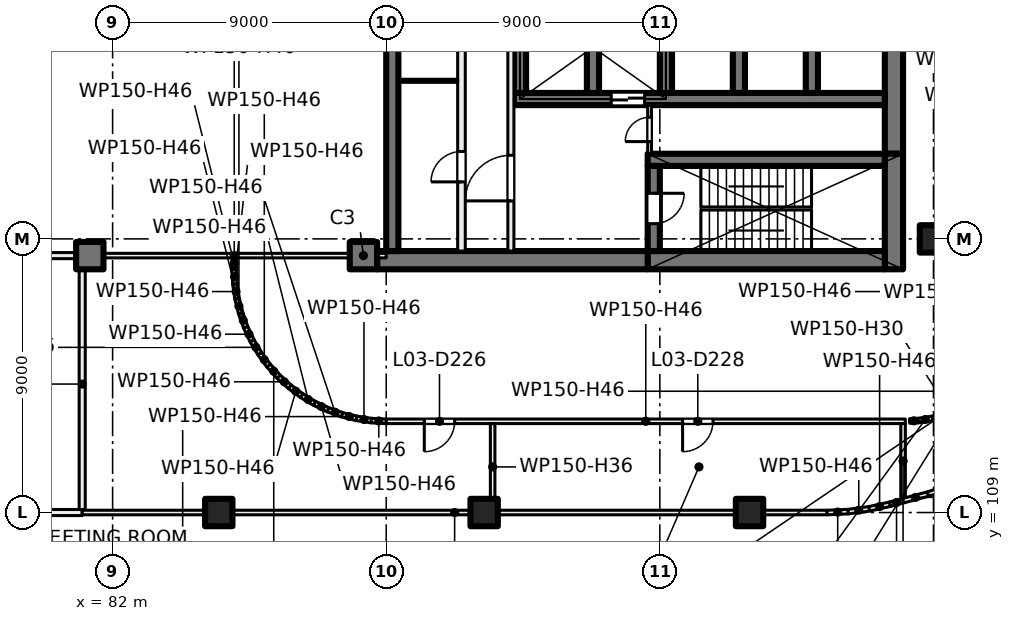
"""IFC4 building model, lengths in metres.
Left out: names, types, materials, properties, quantities, classifications, styles, units other than length and angle.
Written with IfcOpenShell. Run it as: python <this file> out.ifc"""

import sys

from ifc_helpers import new_model, si_unit, direction, frame, frame_2d, origin, origin_2d, place, context, subcontext, project, spatial, rectangle, extrude, element, fill, save


model = new_model("IFC4")
c1 = context("Model", 3, precision=1e-05, world=origin(), true_north=direction((0.0, 1.0)))
c2 = subcontext(c1, "Body", "Model", "MODEL_VIEW")
j1 = project(units=[si_unit("LENGTHUNIT", "METRE"), si_unit("PLANEANGLEUNIT", "RADIAN")], contexts=[c1])
p1 = place(None, origin())
s1 = spatial("IfcSite", under=j1, at=p1, CompositionType="ELEMENT")
p2 = place(p1, origin())
s2 = spatial("IfcBuilding", under=s1, at=p2, CompositionType="ELEMENT")
p3 = place(p2, frame((0.0, 0.0, 17.5)))
s3 = spatial("IfcBuildingStorey", under=s2, at=p3, CompositionType="ELEMENT", Elevation=17.5)
for number, where, z_axis, x_axis in (
    (1, (109.0, 118.0, 0.0), (0.0, 0.0, 1.0), (1.0, 0.0, 0.0)),
    (2, (85.491, 109.0, 0.0), (0.0, 0.0, 1.0), (1.0, 0.0, 0.0)),
    (3, (94.221, 109.0, 0.0), (0.0, 0.0, 1.0), (1.0, 0.0, 0.0)),
    (4, (102.95, 109.0, 0.0), (0.0, 0.0, 1.0), (1.0, 0.0, 0.0)),
    (5, (81.25, 117.45, 0.0), (0.0, 0.0, 1.0), (1.0, 0.0, 0.0)),
    (6, (90.25, 117.45, 0.0), (0.0, 0.0, 1.0), (1.0, 0.0, 0.0)),
):
    element("IfcColumn", number, at=place(p3, frame(where, z_axis=z_axis, x_axis=x_axis)), inside=s3, PredefinedType="COLUMN", context=c2, shape_type="SweptSolid", body=[
        extrude(rectangle(XDim=0.9, YDim=0.9, at=origin_2d()), origin(), (0.0, 0.0, 1.0), 5.0),
    ])
p4 = place(p3, frame((107.7, 135.2, 0.0), z_axis=(0.0, 0.0, 1.0), x_axis=(0.0, -1.0, 0.0)))
e7 = element("IfcWall", 7, at=p4, inside=s3, PredefinedType="SHEAR", context=c2, shape_type="SweptSolid", body=[
    extrude(rectangle(XDim=14.4, YDim=0.6, at=frame_2d((7.2, 0.0))), origin(), (0.0, 0.0, 1.0), 5.0),
])
p5 = place(p3, frame((107.7, 120.8, 0.0), z_axis=(0.0, 0.0, 1.0), x_axis=(0.0, -1.0, 0.0)))
e8 = element("IfcWall", 8, at=p5, inside=s3, PredefinedType="SHEAR", context=c2, shape_type="SweptSolid", body=[
    extrude(rectangle(XDim=3.8, YDim=0.6, at=frame_2d((1.9, 0.0))), origin(), (0.0, 0.0, 1.0), 5.0),
])
p6 = place(p3, frame((107.4, 117.3, 0.0), z_axis=(0.0, 0.0, 1.0), x_axis=(-1.0, 0.0, 0.0)))
e9 = element("IfcWall", 9, at=p6, inside=s3, PredefinedType="SHEAR", context=c2, shape_type="SweptSolid", body=[
    extrude(rectangle(XDim=7.8, YDim=0.6, at=frame_2d((3.9, 0.0))), origin(), (0.0, 0.0, 1.0), 5.0),
])
p7 = place(p3, frame((99.6, 117.3, 0.0), z_axis=(0.0, 0.0, 1.0), x_axis=(-1.0, 0.0, 0.0)))
e10 = element("IfcWall", 10, at=p7, inside=s3, PredefinedType="SHEAR", context=c2, shape_type="SweptSolid", body=[
    extrude(rectangle(XDim=8.9, YDim=0.6, at=frame_2d((4.45, 0.0))), origin(), (0.0, 0.0, 1.0), 5.0),
])
p8 = place(p3, frame((107.4, 120.6, 0.0), z_axis=(0.0, 0.0, 1.0), x_axis=(-1.0, 0.0, 0.0)))
e11 = element("IfcWall", 11, at=p8, inside=s3, PredefinedType="SHEAR", context=c2, shape_type="SweptSolid", body=[
    extrude(rectangle(XDim=7.8, YDim=0.4, at=frame_2d((3.9, 0.0))), origin(), (0.0, 0.0, 1.0), 5.0),
])
p9 = place(p3, frame((99.8, 120.4, 0.0), z_axis=(0.0, 0.0, 1.0), x_axis=(0.0, -1.0, 0.0)))
e12 = element("IfcWall", 12, at=p9, inside=s3, PredefinedType="SHEAR", context=c2, shape_type="SweptSolid", body=[
    extrude(rectangle(XDim=2.8, YDim=0.4, at=frame_2d((1.4, 0.0))), origin(), (0.0, 0.0, 1.0), 5.0),
])
p10 = place(p9, frame((0.9, 0.0, 0.0)))
e13 = element("IfcOpeningElement", 13, at=p10, cuts=e12, PredefinedType="OPENING", context=c2, shape_type="SweptSolid", body=[
    extrude(rectangle(XDim=1.0, YDim=2.1, at=frame_2d((0.5, 1.05))), frame((0.0, 0.21, 0.0), z_axis=(0.0, -1.0, 0.0), x_axis=(1.0, 0.0, 0.0)), (0.0, 0.0, 1.0), 0.42),
])
p11 = place(p3, frame((107.4, 122.6, 0.0), z_axis=(0.0, 0.0, 1.0), x_axis=(-1.0, 0.0, 0.0)))
e14 = element("IfcWall", 14, at=p11, inside=s3, PredefinedType="SHEAR", context=c2, shape_type="SweptSolid", body=[
    extrude(rectangle(XDim=12.2, YDim=0.4, at=frame_2d((6.1, 0.0))), origin(), (0.0, 0.0, 1.0), 5.0),
])
p12 = place(p11, frame((7.9, 0.0, 0.0)))
e15 = element("IfcOpeningElement", 15, at=p12, cuts=e14, PredefinedType="OPENING", context=c2, shape_type="SweptSolid", body=[
    extrude(rectangle(XDim=1.1, YDim=2.1, at=frame_2d((0.55, 1.05))), frame((0.0, 0.21, 0.0), z_axis=(0.0, -1.0, 0.0), x_axis=(1.0, 0.0, 0.0)), (0.0, 0.0, 1.0), 0.42),
])
for number, where, z_axis, x_axis in (
    (16, (105.0, 125.8, 0.0), (0.0, 0.0, 1.0), (0.0, -1.0, 0.0)),
    (17, (102.6, 125.8, 0.0), (0.0, 0.0, 1.0), (0.0, -1.0, 0.0)),
    (18, (100.2, 125.8, 0.0), (0.0, 0.0, 1.0), (0.0, -1.0, 0.0)),
    (19, (97.8, 125.8, 0.0), (0.0, 0.0, 1.0), (0.0, -1.0, 0.0)),
    (20, (95.4, 125.8, 0.0), (0.0, 0.0, 1.0), (0.0, -1.0, 0.0)),
):
    element("IfcWall", number, at=place(p3, frame(where, z_axis=z_axis, x_axis=x_axis)), inside=s3, PredefinedType="SHEAR", context=c2, shape_type="SweptSolid", body=[
        extrude(rectangle(XDim=3.0, YDim=0.4, at=frame_2d((1.5, 0.0))), origin(), (0.0, 0.0, 1.0), 5.0),
    ])
p13 = place(p3, frame((91.2, 126.2, 0.0), z_axis=(0.0, 0.0, 1.0), x_axis=(0.0, -1.0, 0.0)))
e21 = element("IfcWall", 21, at=p13, inside=s3, PredefinedType="SHEAR", context=c2, shape_type="SweptSolid", body=[
    extrude(rectangle(XDim=8.6, YDim=0.4, at=frame_2d((4.3, 0.0))), origin(), (0.0, 0.0, 1.0), 5.0),
])
p14 = place(p3, frame((95.1, 117.6, 0.0), z_axis=(0.0, 0.0, 1.0), x_axis=(0.0, 1.0, 0.0)))
e22 = element("IfcWall", 22, at=p14, inside=s3, PredefinedType="PARTITIONING", context=c2, shape_type="SweptSolid", body=[
    extrude(rectangle(XDim=8.4, YDim=0.2, at=frame_2d((4.2, 0.0))), origin(), (0.0, 0.0, 1.0), 4.6),
])
p15 = place(p14, frame((1.65, 0.0, 0.0)))
e23 = element("IfcOpeningElement", 23, at=p15, cuts=e22, PredefinedType="OPENING", context=c2, shape_type="SweptSolid", body=[
    extrude(rectangle(XDim=1.5, YDim=2.1, at=frame_2d((0.75, 1.05))), frame((0.0, 0.11, 0.0), z_axis=(0.0, -1.0, 0.0), x_axis=(1.0, 0.0, 0.0)), (0.0, 0.0, 1.0), 0.22),
])
p16 = place(p3, frame((93.475, 117.6, 0.0), z_axis=(0.0, 0.0, 1.0), x_axis=(0.0, 1.0, 0.0)))
e24 = element("IfcWall", 24, at=p16, inside=s3, PredefinedType="PARTITIONING", context=c2, shape_type="SweptSolid", body=[
    extrude(rectangle(XDim=8.4, YDim=0.25, at=frame_2d((4.2, 0.0))), origin(), (0.0, 0.0, 1.0), 4.6),
])
p17 = place(p16, frame((6.625, 0.0, 0.0)))
e25 = element("IfcOpeningElement", 25, at=p17, cuts=e24, PredefinedType="OPENING", context=c2, shape_type="SweptSolid", body=[
    extrude(rectangle(XDim=0.8, YDim=2.1, at=frame_2d((0.4, 1.05))), frame((0.0, 0.135, 0.0), z_axis=(0.0, -1.0, 0.0), x_axis=(1.0, 0.0, 0.0)), (0.0, 0.0, 1.0), 0.27),
])
p18 = place(p16, frame((2.275, 0.0, 0.0)))
e26 = element("IfcOpeningElement", 26, at=p18, cuts=e24, PredefinedType="OPENING", context=c2, shape_type="SweptSolid", body=[
    extrude(rectangle(XDim=1.0, YDim=2.1, at=frame_2d((0.5, 1.05))), frame((0.0, 0.135, 0.0), z_axis=(0.0, -1.0, 0.0), x_axis=(1.0, 0.0, 0.0)), (0.0, 0.0, 1.0), 0.27),
])
p19 = place(p3, frame((99.663, 120.8, 0.0), z_axis=(0.0, 0.0, 1.0), x_axis=(0.0, 1.0, 0.0)))
e27 = element("IfcWall", 27, at=p19, inside=s3, PredefinedType="PARTITIONING", context=c2, shape_type="SweptSolid", body=[
    extrude(rectangle(XDim=1.6, YDim=0.125, at=frame_2d((0.8, 0.0))), origin(), (0.0, 0.0, 1.0), 4.6),
])
p20 = place(p19, frame((0.4, 0.0, 0.0)))
e28 = element("IfcOpeningElement", 28, at=p20, cuts=e27, PredefinedType="OPENING", context=c2, shape_type="SweptSolid", body=[
    extrude(rectangle(XDim=0.8, YDim=2.1, at=frame_2d((0.4, 1.05))), frame((0.0, 0.073, 0.0), z_axis=(0.0, -1.0, 0.0), x_axis=(1.0, 0.0, 0.0)), (0.0, 0.0, 1.0), 0.145),
])
p21 = place(p3, frame((93.35, 123.2, 0.0), z_axis=(0.0, 0.0, 1.0), x_axis=(-1.0, 0.0, 0.0)))
e29 = element("IfcWall", 29, at=p21, inside=s3, PredefinedType="PARTITIONING", context=c2, shape_type="SweptSolid", body=[
    extrude(rectangle(XDim=1.95, YDim=0.1, at=frame_2d((0.975, 0.0))), origin(), (0.0, 0.0, 1.0), 4.6),
])
p22 = place(p3, frame((67.5, 109.0, 0.0), z_axis=(0.0, 0.0, 1.0), x_axis=(1.0, 0.0, 0.0)))
e30 = element("IfcWall", 30, at=p22, inside=s3, PredefinedType="PARTITIONING", context=c2, shape_type="SweptSolid", body=[
    extrude(rectangle(XDim=13.5, YDim=0.2, at=frame_2d((6.75, 0.0))), origin(), (0.0, 0.0, 1.0), 3.6),
])
p23 = place(p22, frame((5.85, 0.0, 0.0)))
e31 = element("IfcOpeningElement", 31, at=p23, cuts=e30, PredefinedType="OPENING", context=c2, shape_type="SweptSolid", body=[
    extrude(rectangle(XDim=1.8, YDim=2.1, at=frame_2d((0.9, 1.05))), frame((0.0, 0.11, 0.0), z_axis=(0.0, -1.0, 0.0), x_axis=(1.0, 0.0, 0.0)), (0.0, 0.0, 1.0), 0.22),
])
p24 = place(p3, frame((67.5, 117.45, 0.0), z_axis=(0.0, 0.0, 1.0), x_axis=(1.0, 0.0, 0.0)))
e32 = element("IfcWall", 32, at=p24, inside=s3, PredefinedType="PARTITIONING", context=c2, shape_type="SweptSolid", body=[
    extrude(rectangle(XDim=13.5, YDim=0.2, at=frame_2d((6.75, 0.0))), origin(), (0.0, 0.0, 1.0), 4.6),
])
p25 = place(p24, frame((5.977, 0.0, 0.0)))
e33 = element("IfcOpeningElement", 33, at=p25, cuts=e32, PredefinedType="OPENING", context=c2, shape_type="SweptSolid", body=[
    extrude(rectangle(XDim=1.8, YDim=2.1, at=frame_2d((0.9, 1.05))), frame((0.0, 0.11, 0.0), z_axis=(0.0, -1.0, 0.0), x_axis=(1.0, 0.0, 0.0)), (0.0, 0.0, 1.0), 0.22),
])
p26 = place(p3, frame((81.0, 109.1, 0.0), z_axis=(0.0, 0.0, 1.0), x_axis=(0.0, 1.0, 0.0)))
e34 = element("IfcWall", 34, at=p26, inside=s3, PredefinedType="PARTITIONING", context=c2, shape_type="SweptSolid", body=[
    extrude(rectangle(XDim=8.25, YDim=0.2, at=frame_2d((4.125, 0.0))), origin(), (0.0, 0.0, 1.0), 3.6),
])
p27 = place(p3, frame((81.0, 109.0, 0.0), z_axis=(0.0, 0.0, 1.0), x_axis=(1.0, 0.0, 0.0)))
e35 = element("IfcWall", 35, at=p27, inside=s3, PredefinedType="PARTITIONING", context=c2, shape_type="SweptSolid", body=[
    extrude(rectangle(XDim=24.5, YDim=0.15, at=frame_2d((12.25, 0.0))), origin(), (0.0, 0.0, 1.0), 3.6),
])
p28 = place(p3, frame((81.0, 117.45, 0.0), z_axis=(0.0, 0.0, 1.0), x_axis=(1.0, 0.0, 0.0)))
e36 = element("IfcWall", 36, at=p28, inside=s3, PredefinedType="PARTITIONING", context=c2, shape_type="SweptSolid", body=[
    extrude(rectangle(XDim=10.0, YDim=0.15, at=frame_2d((5.0, 0.0))), origin(), (0.0, 0.0, 1.0), 4.6),
])
p29 = place(p3, frame((86.0, 116.998, 0.0), z_axis=(0.0, 0.0, 1.0), x_axis=(0.0, 1.0, 0.0)))
e37 = element("IfcWall", 37, at=p29, inside=s3, PredefinedType="PARTITIONING", context=c2, shape_type="SweptSolid", body=[
    extrude(rectangle(XDim=0.377, YDim=0.15, at=frame_2d((0.188, 0.0))), origin(), (0.0, 0.0, 1.0), 4.6),
])
p30 = place(p3, frame((86.0, 117.002, 0.0), z_axis=(0.0, 0.0, 1.0), x_axis=(0.048196018647, -0.998837896651, 0.0)))
e38 = element("IfcWall", 38, at=p30, inside=s3, PredefinedType="PARTITIONING", context=c2, shape_type="SweptSolid", body=[
    extrude(rectangle(XDim=0.496, YDim=0.15, at=frame_2d((0.248, 0.0))), origin(), (0.0, 0.0, 1.0), 4.6),
])
p31 = place(p3, frame((86.023, 116.514, 0.0), z_axis=(0.0, 0.0, 1.0), x_axis=(0.148412307247, -0.988925572052, 0.0)))
e39 = element("IfcWall", 39, at=p31, inside=s3, PredefinedType="PARTITIONING", context=c2, shape_type="SweptSolid", body=[
    extrude(rectangle(XDim=0.499, YDim=0.15, at=frame_2d((0.249, 0.0))), origin(), (0.0, 0.0, 1.0), 4.6),
])
p32 = place(p3, frame((86.095, 116.029, 0.0), z_axis=(0.0, 0.0, 1.0), x_axis=(0.242650732785, -0.970113715952, 0.0)))
e40 = element("IfcWall", 40, at=p32, inside=s3, PredefinedType="PARTITIONING", context=c2, shape_type="SweptSolid", body=[
    extrude(rectangle(XDim=0.499, YDim=0.15, at=frame_2d((0.25, 0.0))), origin(), (0.0, 0.0, 1.0), 4.6),
])
for number, where, z_axis, x_axis in (
    (41, (86.214, 115.553, 0.0), (0.0, 0.0, 1.0), (0.337, -0.941, 0.0)),
    (42, (86.379, 115.09, 0.0), (0.0, 0.0, 1.0), (0.428, -0.904, 0.0)),
):
    element("IfcWall", number, at=place(p3, frame(where, z_axis=z_axis, x_axis=x_axis)), inside=s3, PredefinedType="PARTITIONING", context=c2, shape_type="SweptSolid", body=[
        extrude(rectangle(XDim=0.498, YDim=0.15, at=frame_2d((0.249, 0.0))), origin(), (0.0, 0.0, 1.0), 4.6),
    ])
p33 = place(p3, frame((86.588, 114.646, 0.0), z_axis=(0.0, 0.0, 1.0), x_axis=(0.515791778052, -0.85671397893, 0.0)))
e43 = element("IfcWall", 43, at=p33, inside=s3, PredefinedType="PARTITIONING", context=c2, shape_type="SweptSolid", body=[
    extrude(rectangle(XDim=0.499, YDim=0.15, at=frame_2d((0.249, 0.0))), origin(), (0.0, 0.0, 1.0), 4.6),
])
p34 = place(p3, frame((86.841, 114.225, 0.0), z_axis=(0.0, 0.0, 1.0), x_axis=(0.594570362092, -0.80404358372, 0.0)))
e44 = element("IfcWall", 44, at=p34, inside=s3, PredefinedType="PARTITIONING", context=c2, shape_type="SweptSolid", body=[
    extrude(rectangle(XDim=0.498, YDim=0.15, at=frame_2d((0.249, 0.0))), origin(), (0.0, 0.0, 1.0), 4.6),
])
for number, where, z_axis, x_axis in (
    (45, (87.133, 113.831, 0.0), (0.0, 0.0, 1.0), (0.67, -0.742, 0.0)),
    (46, (87.461, 113.467, 0.0), (0.0, 0.0, 1.0), (0.742, -0.67, 0.0)),
):
    element("IfcWall", number, at=place(p3, frame(where, z_axis=z_axis, x_axis=x_axis)), inside=s3, PredefinedType="PARTITIONING", context=c2, shape_type="SweptSolid", body=[
        extrude(rectangle(XDim=0.499, YDim=0.15, at=frame_2d((0.249, 0.0))), origin(), (0.0, 0.0, 1.0), 4.6),
    ])
p35 = place(p3, frame((87.825, 113.137, 0.0), z_axis=(0.0, 0.0, 1.0), x_axis=(0.80404358372, -0.594570362092, 0.0)))
e47 = element("IfcWall", 47, at=p35, inside=s3, PredefinedType="PARTITIONING", context=c2, shape_type="SweptSolid", body=[
    extrude(rectangle(XDim=0.498, YDim=0.15, at=frame_2d((0.249, 0.0))), origin(), (0.0, 0.0, 1.0), 4.6),
])
p36 = place(p3, frame((88.219, 112.845, 0.0), z_axis=(0.0, 0.0, 1.0), x_axis=(0.85671397893, -0.515791778052, 0.0)))
e48 = element("IfcWall", 48, at=p36, inside=s3, PredefinedType="PARTITIONING", context=c2, shape_type="SweptSolid", body=[
    extrude(rectangle(XDim=0.499, YDim=0.15, at=frame_2d((0.249, 0.0))), origin(), (0.0, 0.0, 1.0), 4.6),
])
for number, where, z_axis, x_axis in (
    (49, (88.64, 112.592, 0.0), (0.0, 0.0, 1.0), (0.904, -0.428, 0.0)),
    (50, (89.084, 112.382, 0.0), (0.0, 0.0, 1.0), (0.941, -0.337, 0.0)),
):
    element("IfcWall", number, at=place(p3, frame(where, z_axis=z_axis, x_axis=x_axis)), inside=s3, PredefinedType="PARTITIONING", context=c2, shape_type="SweptSolid", body=[
        extrude(rectangle(XDim=0.498, YDim=0.15, at=frame_2d((0.249, 0.0))), origin(), (0.0, 0.0, 1.0), 4.6),
    ])
p37 = place(p3, frame((89.545, 112.216, 0.0), z_axis=(0.0, 0.0, 1.0), x_axis=(0.970113715952, -0.242650732785, 0.0)))
e51 = element("IfcWall", 51, at=p37, inside=s3, PredefinedType="PARTITIONING", context=c2, shape_type="SweptSolid", body=[
    extrude(rectangle(XDim=0.499, YDim=0.15, at=frame_2d((0.25, 0.0))), origin(), (0.0, 0.0, 1.0), 4.6),
])
p38 = place(p3, frame((90.021, 112.097, 0.0), z_axis=(0.0, 0.0, 1.0), x_axis=(0.988925572052, -0.148412307247, 0.0)))
e52 = element("IfcWall", 52, at=p38, inside=s3, PredefinedType="PARTITIONING", context=c2, shape_type="SweptSolid", body=[
    extrude(rectangle(XDim=0.499, YDim=0.15, at=frame_2d((0.249, 0.0))), origin(), (0.0, 0.0, 1.0), 4.6),
])
p39 = place(p3, frame((90.506, 112.024, 0.0), z_axis=(0.0, 0.0, 1.0), x_axis=(0.998837896651, -0.048196018647, 0.0)))
e53 = element("IfcWall", 53, at=p39, inside=s3, PredefinedType="PARTITIONING", context=c2, shape_type="SweptSolid", body=[
    extrude(rectangle(XDim=0.496, YDim=0.15, at=frame_2d((0.248, 0.0))), origin(), (0.0, 0.0, 1.0), 4.6),
])
p40 = place(p3, frame((108.075, 112.0, 0.0), z_axis=(0.0, 0.0, 1.0), x_axis=(-1.0, 0.0, 0.0)))
e54 = element("IfcWall", 54, at=p40, inside=s3, PredefinedType="PARTITIONING", context=c2, shape_type="SweptSolid", body=[
    extrude(rectangle(XDim=17.077, YDim=0.15, at=frame_2d((8.539, 0.0))), origin(), (0.0, 0.0, 1.0), 4.6),
])
p41 = place(p40, frame((14.823, 0.0, 0.0)))
e55 = element("IfcOpeningElement", 55, at=p41, cuts=e54, PredefinedType="OPENING", context=c2, shape_type="SweptSolid", body=[
    extrude(rectangle(XDim=1.0, YDim=2.1, at=frame_2d((0.5, 1.05))), frame((0.0, 0.085, 0.0), z_axis=(0.0, -1.0, 0.0), x_axis=(1.0, 0.0, 0.0)), (0.0, 0.0, 1.0), 0.17),
])
p42 = place(p40, frame((6.327, 0.0, 0.0)))
e56 = element("IfcOpeningElement", 56, at=p42, cuts=e54, PredefinedType="OPENING", context=c2, shape_type="SweptSolid", body=[
    extrude(rectangle(XDim=1.0, YDim=2.1, at=frame_2d((0.5, 1.05))), frame((0.0, 0.085, 0.0), z_axis=(0.0, -1.0, 0.0), x_axis=(1.0, 0.0, 0.0)), (0.0, 0.0, 1.0), 0.17),
])
p43 = place(p3, frame((94.5, 109.075, 0.0), z_axis=(0.0, 0.0, 1.0), x_axis=(0.0, 1.0, 0.0)))
e57 = element("IfcWall", 57, at=p43, inside=s3, PredefinedType="PARTITIONING", context=c2, shape_type="SweptSolid", body=[
    extrude(rectangle(XDim=2.85, YDim=0.15, at=frame_2d((1.425, 0.0))), origin(), (0.0, 0.0, 1.0), 3.6),
])
p44 = place(p3, frame((105.5, 109.0, 0.0), z_axis=(0.0, 0.0, 1.0), x_axis=(0.999080978163, 0.042862560277, 0.0)))
e58 = element("IfcWall", 58, at=p44, inside=s3, PredefinedType="PARTITIONING", context=c2, shape_type="SweptSolid", body=[
    extrude(rectangle(XDim=0.701, YDim=0.15, at=frame_2d((0.35, 0.0))), origin(), (0.0, 0.0, 1.0), 4.6),
])
p45 = place(p3, frame((106.194, 109.03, 0.0), z_axis=(0.0, 0.0, 1.0), x_axis=(0.991417667389, 0.130732585032, 0.0)))
e59 = element("IfcWall", 59, at=p45, inside=s3, PredefinedType="PARTITIONING", context=c2, shape_type="SweptSolid", body=[
    extrude(rectangle(XDim=0.704, YDim=0.15, at=frame_2d((0.352, 0.0))), origin(), (0.0, 0.0, 1.0), 4.6),
])
p46 = place(p3, frame((106.886, 109.121, 0.0), z_axis=(0.0, 0.0, 1.0), x_axis=(0.976301537339, 0.216414667222, 0.0)))
e60 = element("IfcWall", 60, at=p46, inside=s3, PredefinedType="PARTITIONING", context=c2, shape_type="SweptSolid", body=[
    extrude(rectangle(XDim=0.702, YDim=0.15, at=frame_2d((0.351, 0.0))), origin(), (0.0, 0.0, 1.0), 4.6),
])
p47 = place(p3, frame((107.571, 109.273, 0.0), z_axis=(0.0, 0.0, 1.0), x_axis=(0.965896509383, 0.25892843251, 0.0)))
e61 = element("IfcWall", 61, at=p47, inside=s3, PredefinedType="PARTITIONING", context=c2, shape_type="SweptSolid", body=[
    extrude(rectangle(XDim=0.444, YDim=0.15, at=frame_2d((0.222, 0.0))), origin(), (0.0, 0.0, 1.0), 4.6),
])
p48 = place(p3, frame((108.0, 109.466, 0.0), z_axis=(0.0, 0.0, 1.0), x_axis=(0.0, 1.0, 0.0)))
e62 = element("IfcWall", 62, at=p48, inside=s3, PredefinedType="PARTITIONING", context=c2, shape_type="SweptSolid", body=[
    extrude(rectangle(XDim=2.459, YDim=0.15, at=frame_2d((1.229, 0.0))), origin(), (0.0, 0.0, 1.0), 3.6),
])
p49 = place(p3, frame((108.0, 109.388, 0.0), z_axis=(0.0, 0.0, 1.0), x_axis=(0.965800850795, 0.259285010374, 0.0)))
e63 = element("IfcWall", 63, at=p49, inside=s3, PredefinedType="PARTITIONING", context=c2, shape_type="SweptSolid", body=[
    extrude(rectangle(XDim=0.852, YDim=0.15, at=frame_2d((0.426, 0.0))), origin(), (0.0, 0.0, 1.0), 4.6),
])
p50 = place(p3, frame((108.214, 112.01, 0.0), z_axis=(0.0, 0.0, 1.0), x_axis=(0.99876534507, 0.049676810357, 0.0)))
e64 = element("IfcWall", 64, at=p50, inside=s3, PredefinedType="PARTITIONING", context=c2, shape_type="SweptSolid", body=[
    extrude(rectangle(XDim=0.28, YDim=0.15, at=frame_2d((0.14, 0.0))), origin(), (0.0, 0.0, 1.0), 4.6),
])
p51 = place(p3, frame((108.486, 112.023, 0.0), z_axis=(0.0, 0.0, 1.0), x_axis=(0.988925572052, 0.148412307247, 0.0)))
e65 = element("IfcWall", 65, at=p51, inside=s3, PredefinedType="PARTITIONING", context=c2, shape_type="SweptSolid", body=[
    extrude(rectangle(XDim=0.499, YDim=0.15, at=frame_2d((0.249, 0.0))), origin(), (0.0, 0.0, 1.0), 4.6),
])
p52 = place(p3, frame((108.819, 109.607, 0.0), z_axis=(0.0, 0.0, 1.0), x_axis=(0.95125726357, 0.308398473578, 0.0)))
e66 = element("IfcWall", 66, at=p52, inside=s3, PredefinedType="PARTITIONING", context=c2, shape_type="SweptSolid", body=[
    extrude(rectangle(XDim=0.843, YDim=0.15, at=frame_2d((0.421, 0.0))), origin(), (0.0, 0.0, 1.0), 4.6),
])
p53 = place(p3, frame((108.971, 112.095, 0.0), z_axis=(0.0, 0.0, 1.0), x_axis=(0.970113715952, 0.242650732785, 0.0)))
e67 = element("IfcWall", 67, at=p53, inside=s3, PredefinedType="PARTITIONING", context=c2, shape_type="SweptSolid", body=[
    extrude(rectangle(XDim=0.499, YDim=0.15, at=frame_2d((0.25, 0.0))), origin(), (0.0, 0.0, 1.0), 4.6),
])
p54 = place(p15, origin())
e68 = element("IfcDoor", 68, at=p54, inside=s3, OperationType="DOUBLE_DOOR_SINGLE_SWING", PredefinedType="DOOR", context=c2, shape_type="SweptSolid", body=[
    extrude(rectangle(XDim=1.5, YDim=2.1, at=frame_2d((0.75, 1.05))), frame((0.0, 0.025, 0.0), z_axis=(0.0, -1.0, 0.0), x_axis=(1.0, 0.0, 0.0)), (0.0, 0.0, 1.0), 0.05),
])
fill(e23, e68)
p55 = place(p10, origin())
e69 = element("IfcDoor", 69, at=p55, inside=s3, OperationType="SINGLE_SWING_LEFT", PredefinedType="DOOR", context=c2, shape_type="SweptSolid", body=[
    extrude(rectangle(XDim=1.0, YDim=2.1, at=frame_2d((0.5, 1.05))), frame((0.0, 0.025, 0.0), z_axis=(0.0, -1.0, 0.0), x_axis=(1.0, 0.0, 0.0)), (0.0, 0.0, 1.0), 0.05),
])
fill(e13, e69)
p56 = place(p20, origin())
e70 = element("IfcDoor", 70, at=p56, inside=s3, OperationType="SINGLE_SWING_RIGHT", PredefinedType="DOOR", context=c2, shape_type="SweptSolid", body=[
    extrude(rectangle(XDim=0.8, YDim=2.1, at=frame_2d((0.4, 1.05))), frame((0.0, 0.025, 0.0), z_axis=(0.0, -1.0, 0.0), x_axis=(1.0, 0.0, 0.0)), (0.0, 0.0, 1.0), 0.05),
])
fill(e28, e70)
p57 = place(p18, origin())
e71 = element("IfcDoor", 71, at=p57, inside=s3, OperationType="SINGLE_SWING_RIGHT", PredefinedType="DOOR", context=c2, shape_type="SweptSolid", body=[
    extrude(rectangle(XDim=1.0, YDim=2.1, at=frame_2d((0.5, 1.05))), frame((0.0, 0.025, 0.0), z_axis=(0.0, -1.0, 0.0), x_axis=(1.0, 0.0, 0.0)), (0.0, 0.0, 1.0), 0.05),
])
fill(e26, e71)
p58 = place(p12, origin())
e72 = element("IfcDoor", 72, at=p58, inside=s3, OperationType="DOUBLE_DOOR_SLIDING", PredefinedType="DOOR", context=c2, shape_type="SweptSolid", body=[
    extrude(rectangle(XDim=1.1, YDim=2.1, at=frame_2d((0.55, 1.05))), frame((0.0, 0.025, 0.0), z_axis=(0.0, -1.0, 0.0), x_axis=(1.0, 0.0, 0.0)), (0.0, 0.0, 1.0), 0.05),
])
fill(e15, e72)
p59 = place(p41, origin())
e73 = element("IfcDoor", 73, at=p59, inside=s3, OperationType="SINGLE_SWING_RIGHT", PredefinedType="DOOR", context=c2, shape_type="SweptSolid", body=[
    extrude(rectangle(XDim=1.0, YDim=2.1, at=frame_2d((0.5, 1.05))), frame((0.0, 0.025, 0.0), z_axis=(0.0, -1.0, 0.0), x_axis=(1.0, 0.0, 0.0)), (0.0, 0.0, 1.0), 0.05),
])
fill(e55, e73)
p60 = place(p42, origin())
e74 = element("IfcDoor", 74, at=p60, inside=s3, OperationType="SINGLE_SWING_RIGHT", PredefinedType="DOOR", context=c2, shape_type="SweptSolid", body=[
    extrude(rectangle(XDim=1.0, YDim=2.1, at=frame_2d((0.5, 1.05))), frame((0.0, 0.025, 0.0), z_axis=(0.0, -1.0, 0.0), x_axis=(1.0, 0.0, 0.0)), (0.0, 0.0, 1.0), 0.05),
])
fill(e56, e74)
save(model, sys.argv[1])
